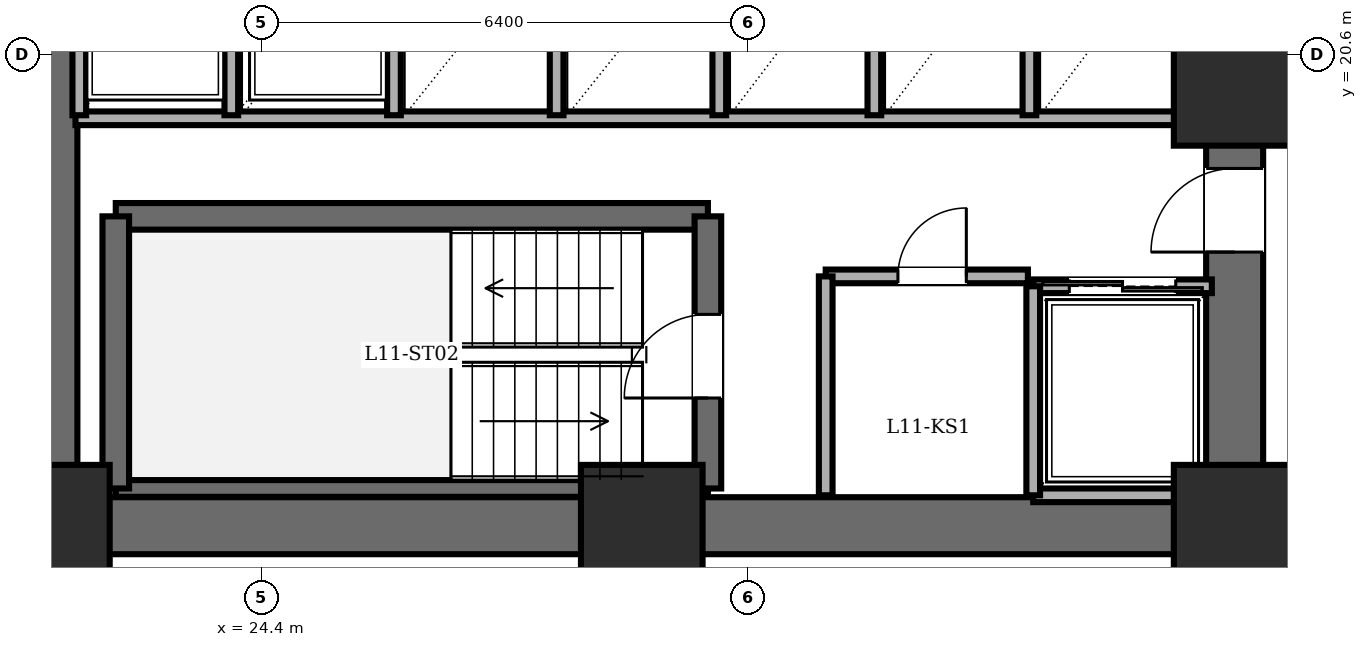
"""IFC4 building model, lengths in metres.
Left out: names, types, materials, properties, quantities, classifications, styles, units other than length and angle.
Written with IfcOpenShell. Run it as: python <this file> out.ifc"""

import sys

from ifc_helpers import new_model, si_unit, direction, frame, frame_2d, origin, origin_2d, place, context, subcontext, project, spatial, rectangle, extrude, element, fill, save


model = new_model("IFC4")
c1 = context("Model", 3, precision=1e-05, world=origin(), true_north=direction((0.0, 1.0)))
c2 = subcontext(c1, "Body", "Model", "MODEL_VIEW")
j1 = project(units=[si_unit("LENGTHUNIT", "METRE"), si_unit("PLANEANGLEUNIT", "RADIAN")], contexts=[c1])
p1 = place(None, origin())
s1 = spatial("IfcSite", under=j1, at=p1, CompositionType="ELEMENT")
p2 = place(p1, origin())
s2 = spatial("IfcBuilding", under=s1, at=p2, CompositionType="ELEMENT")
p3 = place(p2, frame((0.0, 0.0, 43.2)))
s3 = spatial("IfcBuildingStorey", under=s2, at=p3, CompositionType="ELEMENT", Elevation=43.2)
for number, where, z_axis, x_axis in (
    (1, (21.6, 14.4, 0.0), (0.0, 0.0, 1.0), (1.0, 0.0, 0.0)),
    (2, (29.4, 14.4, 0.0), (0.0, 0.0, 1.0), (1.0, 0.0, 0.0)),
    (3, (37.2, 14.4, 0.0), (0.0, 0.0, 1.0), (1.0, 0.0, 0.0)),
    (4, (37.2, 20.2, 0.0), (0.0, 0.0, 1.0), (1.0, 0.0, 0.0)),
):
    element("IfcColumn", number, at=place(p3, frame(where, z_axis=z_axis, x_axis=x_axis)), inside=s3, PredefinedType="COLUMN", context=c2, shape_type="SweptSolid", body=[
        extrude(rectangle(XDim=1.6, YDim=1.6, at=origin_2d()), origin(), (0.0, 0.0, 1.0), 3.6),
    ])
p4 = place(p3, frame((21.6, 14.4, 0.0), z_axis=(0.0, 0.0, 1.0), x_axis=(0.0, 1.0, 0.0)))
e5 = element("IfcWall", 5, at=p4, inside=s3, PredefinedType="SHEAR", context=c2, shape_type="SweptSolid", body=[
    extrude(rectangle(XDim=19.2, YDim=0.75, at=frame_2d((9.6, 0.0))), origin(), (0.0, 0.0, 1.0), 3.4),
])
p5 = place(p3, frame((37.2, 14.4, 0.0), z_axis=(0.0, 0.0, 1.0), x_axis=(-1.0, 0.0, 0.0)))
e6 = element("IfcWall", 6, at=p5, inside=s3, PredefinedType="SHEAR", context=c2, shape_type="SweptSolid", body=[
    extrude(rectangle(XDim=15.6, YDim=0.75, at=frame_2d((7.8, 0.0))), origin(), (0.0, 0.0, 1.0), 3.4),
])
p6 = place(p3, frame((37.2, 14.4, 0.0), z_axis=(0.0, 0.0, 1.0), x_axis=(0.0, 1.0, 0.0)))
e7 = element("IfcWall", 7, at=p6, inside=s3, PredefinedType="SHEAR", context=c2, shape_type="SweptSolid", body=[
    extrude(rectangle(XDim=19.2, YDim=0.75, at=frame_2d((9.6, 0.0))), origin(), (0.0, 0.0, 1.0), 3.4),
])
p7 = place(p6, frame((15.8, 0.0, 0.0)))
e8 = element("IfcOpeningElement", 8, at=p7, cuts=e7, PredefinedType="OPENING", context=c2, shape_type="SweptSolid", body=[
    extrude(rectangle(XDim=1.15, YDim=2.15, at=frame_2d((0.575, 1.075))), frame((0.0, 0.385, 0.0), z_axis=(0.0, -1.0, 0.0), x_axis=(1.0, 0.0, 0.0)), (0.0, 0.0, 1.0), 0.77),
])
p8 = place(p6, frame((3.6, 0.0, 0.0)))
e9 = element("IfcOpeningElement", 9, at=p8, cuts=e7, PredefinedType="OPENING", context=c2, shape_type="SweptSolid", body=[
    extrude(rectangle(XDim=1.1, YDim=2.15, at=frame_2d((0.55, 1.075))), frame((0.0, 0.385, 0.0), z_axis=(0.0, -1.0, 0.0), x_axis=(1.0, 0.0, 0.0)), (0.0, 0.0, 1.0), 0.77),
])
p9 = place(p6, frame((8.6, 0.0, 0.0)))
e10 = element("IfcOpeningElement", 10, at=p9, cuts=e7, PredefinedType="OPENING", context=c2, shape_type="SweptSolid", body=[
    extrude(rectangle(XDim=1.3, YDim=2.2, at=frame_2d((0.65, 1.1))), frame((0.0, 0.385, 0.0), z_axis=(0.0, -1.0, 0.0), x_axis=(1.0, 0.0, 0.0)), (0.0, 0.0, 1.0), 0.77),
])
p10 = place(p3, frame((22.48, 18.47, 0.0), z_axis=(0.0, 0.0, 1.0), x_axis=(1.0, 0.0, 0.0)))
e11 = element("IfcWall", 11, at=p10, inside=s3, PredefinedType="SOLIDWALL", context=c2, shape_type="SweptSolid", body=[
    extrude(rectangle(XDim=7.79, YDim=0.35, at=frame_2d((3.895, 0.0))), origin(), (0.0, 0.0, 1.0), 3.4),
])
p11 = place(p3, frame((22.48, 14.89, 0.0), z_axis=(0.0, 0.0, 1.0), x_axis=(1.0, 0.0, 0.0)))
e12 = element("IfcWall", 12, at=p11, inside=s3, PredefinedType="PARTITIONING", context=c2, shape_type="SweptSolid", body=[
    extrude(rectangle(XDim=7.79, YDim=0.22, at=frame_2d((3.895, 0.0))), origin(), (0.0, 0.0, 1.0), 3.4),
])
p12 = place(p3, frame((22.48, 14.89, 0.0), z_axis=(0.0, 0.0, 1.0), x_axis=(0.0, 1.0, 0.0)))
e13 = element("IfcWall", 13, at=p12, inside=s3, PredefinedType="SOLIDWALL", context=c2, shape_type="SweptSolid", body=[
    extrude(rectangle(XDim=3.58, YDim=0.35, at=frame_2d((1.79, 0.0))), origin(), (0.0, 0.0, 1.0), 3.4),
])
p13 = place(p3, frame((30.27, 14.89, 0.0), z_axis=(0.0, 0.0, 1.0), x_axis=(0.0, 1.0, 0.0)))
e14 = element("IfcWall", 14, at=p13, inside=s3, PredefinedType="SOLIDWALL", context=c2, shape_type="SweptSolid", body=[
    extrude(rectangle(XDim=3.58, YDim=0.35, at=frame_2d((1.79, 0.0))), origin(), (0.0, 0.0, 1.0), 3.4),
])
p14 = place(p13, frame((1.19, 0.0, 0.0)))
e15 = element("IfcOpeningElement", 15, at=p14, cuts=e14, PredefinedType="OPENING", context=c2, shape_type="SweptSolid", body=[
    extrude(rectangle(XDim=1.1, YDim=2.15, at=frame_2d((0.55, 1.075))), frame((0.0, 0.185, 0.0), z_axis=(0.0, -1.0, 0.0), x_axis=(1.0, 0.0, 0.0)), (0.0, 0.0, 1.0), 0.37),
])
p15 = place(p3, frame((21.95, 19.76, 0.0), z_axis=(0.0, 0.0, 1.0), x_axis=(1.0, 0.0, 0.0)))
e16 = element("IfcWall", 16, at=p15, inside=s3, PredefinedType="PARTITIONING", context=c2, shape_type="SweptSolid", body=[
    extrude(rectangle(XDim=14.87, YDim=0.18, at=frame_2d((7.435, 0.0))), origin(), (0.0, 0.0, 1.0), 3.4),
])
p16 = place(p3, frame((31.82, 17.68, 0.0), z_axis=(0.0, 0.0, 1.0), x_axis=(1.0, 0.0, 0.0)))
e17 = element("IfcWall", 17, at=p16, inside=s3, PredefinedType="PARTITIONING", context=c2, shape_type="SweptSolid", body=[
    extrude(rectangle(XDim=2.66, YDim=0.18, at=frame_2d((1.33, 0.0))), origin(), (0.0, 0.0, 1.0), 3.4),
])
p17 = place(p16, frame((0.95, 0.0, 0.0)))
e18 = element("IfcOpeningElement", 18, at=p17, cuts=e17, PredefinedType="OPENING", context=c2, shape_type="SweptSolid", body=[
    extrude(rectangle(XDim=0.9, YDim=2.05, at=frame_2d((0.45, 1.025))), frame((0.0, 0.1, 0.0), z_axis=(0.0, -1.0, 0.0), x_axis=(1.0, 0.0, 0.0)), (0.0, 0.0, 1.0), 0.2),
])
p18 = place(p3, frame((31.82, 14.8, 0.0), z_axis=(0.0, 0.0, 1.0), x_axis=(0.0, 1.0, 0.0)))
e19 = element("IfcWall", 19, at=p18, inside=s3, PredefinedType="PARTITIONING", context=c2, shape_type="SweptSolid", body=[
    extrude(rectangle(XDim=2.88, YDim=0.18, at=frame_2d((1.44, 0.0))), origin(), (0.0, 0.0, 1.0), 3.4),
])
p19 = place(p3, frame((34.55, 17.55, 0.0), z_axis=(0.0, 0.0, 1.0), x_axis=(1.0, 0.0, 0.0)))
e20 = element("IfcWall", 20, at=p19, inside=s3, PredefinedType="PARTITIONING", context=c2, shape_type="SweptSolid", body=[
    extrude(rectangle(XDim=2.35, YDim=0.18, at=frame_2d((1.175, 0.0))), origin(), (0.0, 0.0, 1.0), 3.4),
])
p20 = place(p19, frame((0.475, 0.0, 0.0)))
e21 = element("IfcOpeningElement", 21, at=p20, cuts=e20, PredefinedType="OPENING", context=c2, shape_type="SweptSolid", body=[
    extrude(rectangle(XDim=1.4, YDim=2.3, at=frame_2d((0.7, 1.15))), frame((0.0, 0.1, 0.0), z_axis=(0.0, -1.0, 0.0), x_axis=(1.0, 0.0, 0.0)), (0.0, 0.0, 1.0), 0.2),
])
p21 = place(p3, frame((36.9, 14.8, 0.0), z_axis=(0.0, 0.0, 1.0), x_axis=(-1.0, 0.0, 0.0)))
e22 = element("IfcWall", 22, at=p21, inside=s3, PredefinedType="PARTITIONING", context=c2, shape_type="SweptSolid", body=[
    extrude(rectangle(XDim=2.35, YDim=0.18, at=frame_2d((1.175, 0.0))), origin(), (0.0, 0.0, 1.0), 3.4),
])
p22 = place(p3, frame((34.55, 17.55, 0.0), z_axis=(0.0, 0.0, 1.0), x_axis=(0.0, -1.0, 0.0)))
e23 = element("IfcWall", 23, at=p22, inside=s3, PredefinedType="PARTITIONING", context=c2, shape_type="SweptSolid", body=[
    extrude(rectangle(XDim=2.75, YDim=0.18, at=frame_2d((1.375, 0.0))), origin(), (0.0, 0.0, 1.0), 3.4),
])
for number, where, z_axis, x_axis in (
    (24, (24.0, 19.8, 0.0), (0.0, 0.0, 1.0), (0.0, 1.0, 0.0)),
    (25, (22.0, 22.3, 0.0), (0.0, 0.0, 1.0), (0.0, -1.0, 0.0)),
    (26, (26.14, 19.8, 0.0), (0.0, 0.0, 1.0), (0.0, 1.0, 0.0)),
    (27, (28.28, 19.8, 0.0), (0.0, 0.0, 1.0), (0.0, 1.0, 0.0)),
    (28, (30.42, 19.8, 0.0), (0.0, 0.0, 1.0), (0.0, 1.0, 0.0)),
    (29, (32.46, 19.8, 0.0), (0.0, 0.0, 1.0), (0.0, 1.0, 0.0)),
    (30, (34.5, 19.8, 0.0), (0.0, 0.0, 1.0), (0.0, 1.0, 0.0)),
    (31, (36.54, 19.8, 0.0), (0.0, 0.0, 1.0), (0.0, 1.0, 0.0)),
):
    element("IfcWall", number, at=place(p3, frame(where, z_axis=z_axis, x_axis=x_axis)), inside=s3, PredefinedType="PARTITIONING", context=c2, shape_type="SweptSolid", body=[
        extrude(rectangle(XDim=2.5, YDim=0.18, at=frame_2d((1.25, 0.0))), origin(), (0.0, 0.0, 1.0), 3.4),
    ])
p23 = place(p14, origin())
e32 = element("IfcDoor", 32, at=p23, inside=s3, OperationType="SINGLE_SWING_LEFT", PredefinedType="DOOR", context=c2, shape_type="SweptSolid", body=[
    extrude(rectangle(XDim=1.1, YDim=2.15, at=frame_2d((0.55, 1.075))), frame((0.0, 0.025, 0.0), z_axis=(0.0, -1.0, 0.0), x_axis=(1.0, 0.0, 0.0)), (0.0, 0.0, 1.0), 0.05),
])
fill(e15, e32)
p24 = place(p8, origin())
e33 = element("IfcDoor", 33, at=p24, inside=s3, OperationType="SINGLE_SWING_LEFT", PredefinedType="DOOR", context=c2, shape_type="SweptSolid", body=[
    extrude(rectangle(XDim=1.1, YDim=2.15, at=frame_2d((0.55, 1.075))), frame((0.0, 0.025, 0.0), z_axis=(0.0, -1.0, 0.0), x_axis=(1.0, 0.0, 0.0)), (0.0, 0.0, 1.0), 0.05),
])
fill(e9, e33)
p25 = place(p17, origin())
e34 = element("IfcDoor", 34, at=p25, inside=s3, OperationType="SINGLE_SWING_RIGHT", PredefinedType="DOOR", context=c2, shape_type="SweptSolid", body=[
    extrude(rectangle(XDim=0.9, YDim=2.05, at=frame_2d((0.45, 1.025))), frame((0.0, 0.025, 0.0), z_axis=(0.0, -1.0, 0.0), x_axis=(1.0, 0.0, 0.0)), (0.0, 0.0, 1.0), 0.05),
])
fill(e18, e34)
p26 = place(p20, origin())
e35 = element("IfcDoor", 35, at=p26, inside=s3, OperationType="DOUBLE_DOOR_SLIDING", PredefinedType="DOOR", context=c2, shape_type="SweptSolid", body=[
    extrude(rectangle(XDim=1.4, YDim=2.3, at=frame_2d((0.7, 1.15))), frame((0.0, 0.025, 0.0), z_axis=(0.0, -1.0, 0.0), x_axis=(1.0, 0.0, 0.0)), (0.0, 0.0, 1.0), 0.05),
])
fill(e21, e35)
save(model, sys.argv[1])
